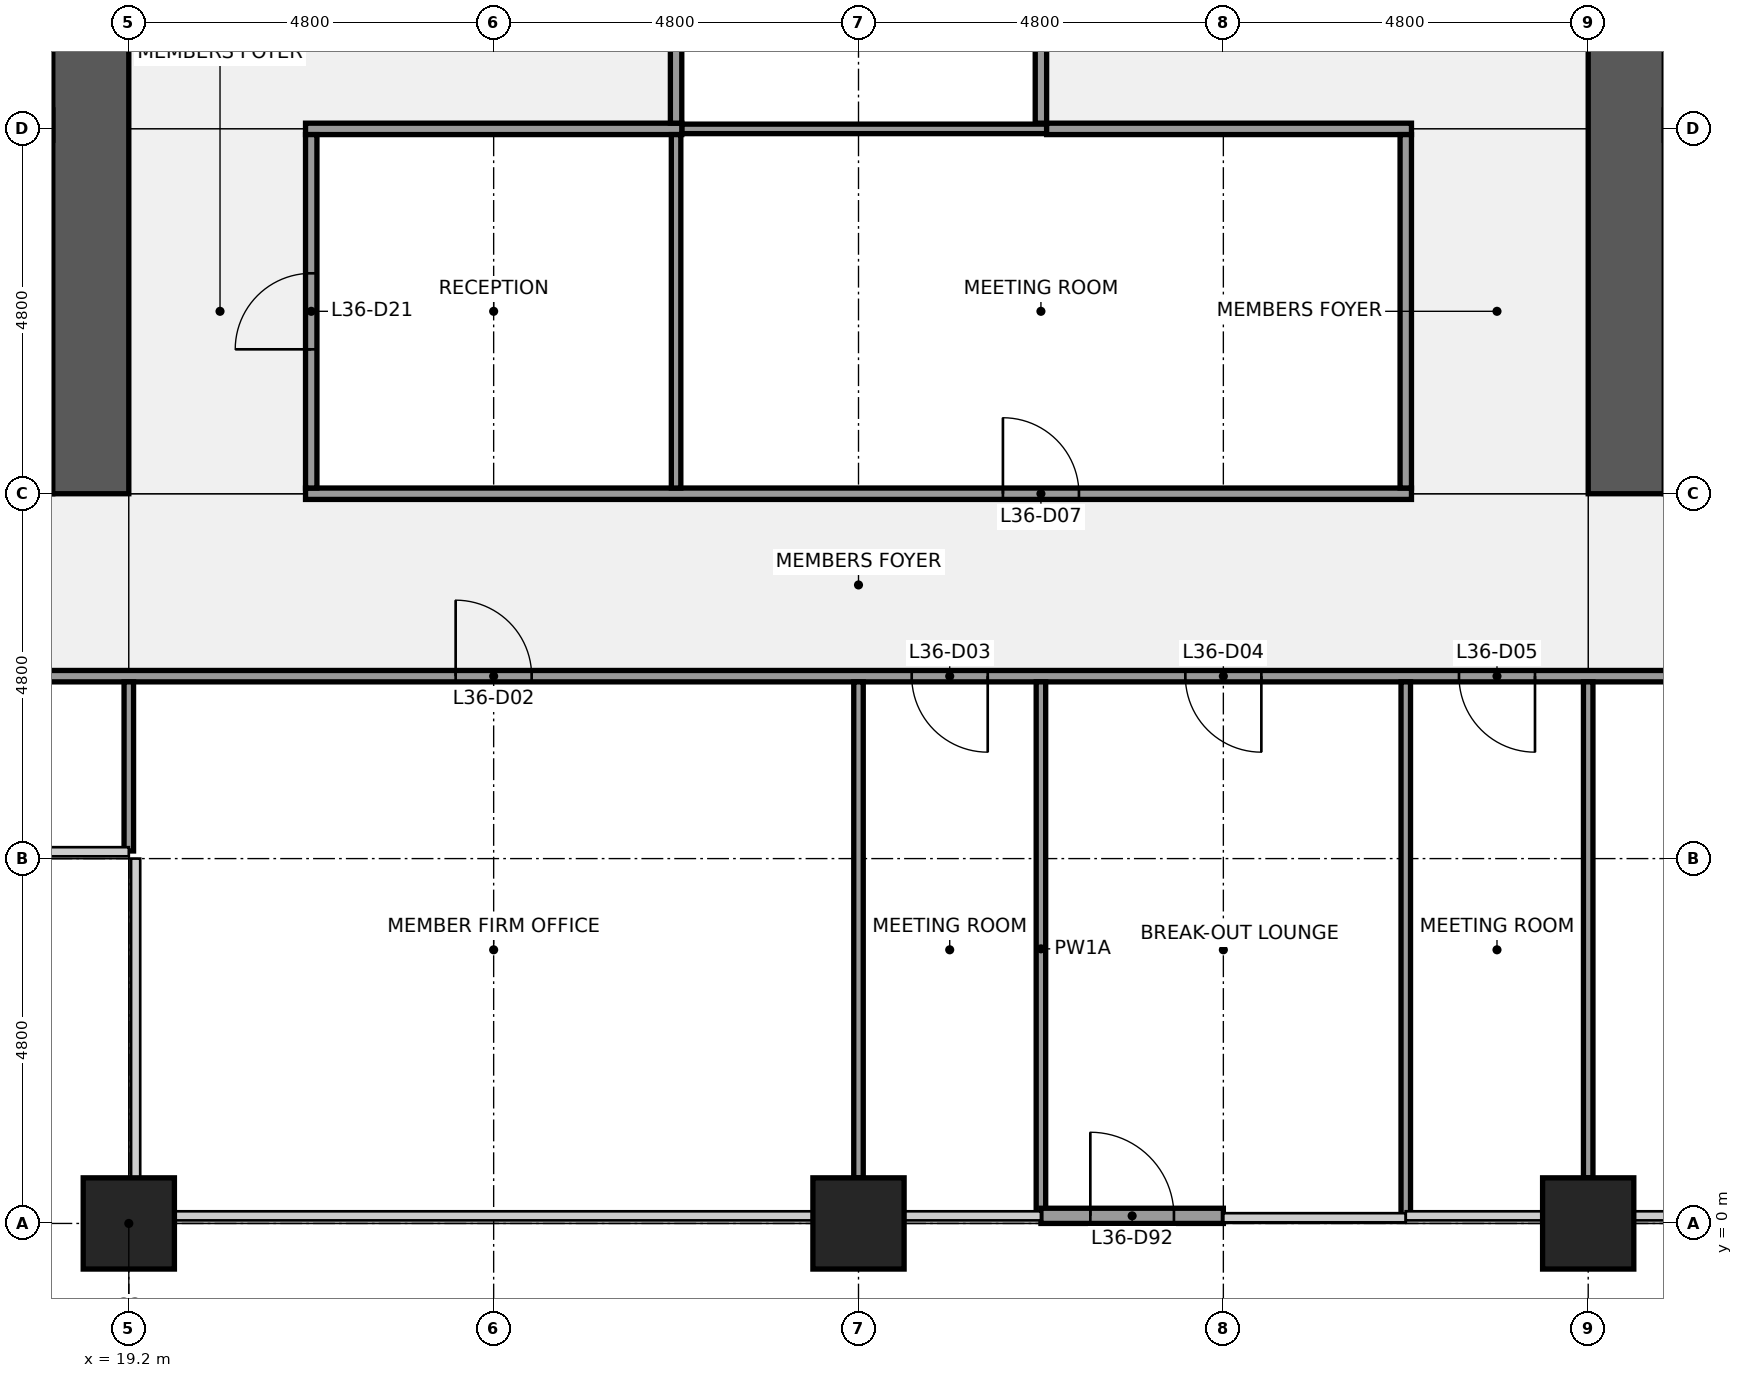
"""IFC4 building model, lengths in metres.
Left out: names, types, materials, properties, quantities, classifications, styles, units other than length and angle.
Written with IfcOpenShell. Run it as: python <this file> out.ifc"""

import sys

from ifc_helpers import new_model, si_unit, direction, frame, frame_2d, origin, origin_2d, place, context, subcontext, project, spatial, rectangle, extrude, element, fill, save


model = new_model("IFC4")
c1 = context("Model", 3, precision=1e-05, world=origin(), true_north=direction((0.0, 1.0)))
c2 = subcontext(c1, "Body", "Model", "MODEL_VIEW")
j1 = project(units=[si_unit("LENGTHUNIT", "METRE"), si_unit("PLANEANGLEUNIT", "RADIAN")], contexts=[c1])
p1 = place(None, origin())
s1 = spatial("IfcSite", under=j1, at=p1, CompositionType="ELEMENT")
p2 = place(p1, origin())
s2 = spatial("IfcBuilding", under=s1, at=p2, CompositionType="ELEMENT")
p3 = place(p2, frame((0.0, 0.0, 164.1)))
s3 = spatial("IfcBuildingStorey", under=s2, at=p3, CompositionType="ELEMENT", Elevation=164.1)
for number, where, z_axis, x_axis in (
    (1, (19.2, 0.0, 0.0), (0.0, 0.0, 1.0), (1.0, 0.0, 0.0)),
    (2, (28.8, 0.0, 0.0), (0.0, 0.0, 1.0), (1.0, 0.0, 0.0)),
    (3, (38.4, 0.0, 0.0), (0.0, 0.0, 1.0), (1.0, 0.0, 0.0)),
):
    element("IfcColumn", number, at=place(p3, frame(where, z_axis=z_axis, x_axis=x_axis)), inside=s3, PredefinedType="COLUMN", context=c2, shape_type="SweptSolid", body=[
        extrude(rectangle(XDim=1.2, YDim=1.2, at=origin_2d()), origin(), (0.0, 0.0, 1.0), 4.0),
    ])
p4 = place(p3, frame((18.2, 10.1, 0.0), z_axis=(0.0, 0.0, 1.0), x_axis=(-1.0, 0.0, 0.0)))
e4 = element("IfcWall", 4, at=p4, inside=s3, PredefinedType="SHEAR", context=c2, shape_type="SweptSolid", body=[
    extrude(rectangle(XDim=8.6, YDim=1.0, at=frame_2d((4.3, 0.0))), origin(), (0.0, 0.0, 1.0), 3.84),
])
p5 = place(p4, frame((0.85, 0.0, 0.0)))
e5 = element("IfcOpeningElement", 5, at=p5, cuts=e4, PredefinedType="OPENING", context=c2, shape_type="SweptSolid", body=[
    extrude(rectangle(XDim=1.1, YDim=2.1, at=frame_2d((0.55, 1.05))), frame((0.0, 0.51, 0.0), z_axis=(0.0, -1.0, 0.0), x_axis=(1.0, 0.0, 0.0)), (0.0, 0.0, 1.0), 1.02),
])
p6 = place(p3, frame((18.7, 38.4, 0.0), z_axis=(0.0, 0.0, 1.0), x_axis=(0.0, -1.0, 0.0)))
e6 = element("IfcWall", 6, at=p6, inside=s3, PredefinedType="SHEAR", context=c2, shape_type="SweptSolid", body=[
    extrude(rectangle(XDim=28.8, YDim=1.0, at=frame_2d((14.4, 0.0))), origin(), (0.0, 0.0, 1.0), 3.84),
])
p7 = place(p6, frame((18.3, 0.0, 0.0)))
e7 = element("IfcOpeningElement", 7, at=p7, cuts=e6, PredefinedType="OPENING", context=c2, shape_type="SweptSolid", body=[
    extrude(rectangle(XDim=1.8, YDim=2.1, at=frame_2d((0.9, 1.05))), frame((0.0, 0.51, 0.0), z_axis=(0.0, -1.0, 0.0), x_axis=(1.0, 0.0, 0.0)), (0.0, 0.0, 1.0), 1.02),
])
p8 = place(p6, frame((8.7, 0.0, 0.0)))
e8 = element("IfcOpeningElement", 8, at=p8, cuts=e6, PredefinedType="OPENING", context=c2, shape_type="SweptSolid", body=[
    extrude(rectangle(XDim=1.8, YDim=2.1, at=frame_2d((0.9, 1.05))), frame((0.0, 0.51, 0.0), z_axis=(0.0, -1.0, 0.0), x_axis=(1.0, 0.0, 0.0)), (0.0, 0.0, 1.0), 1.02),
])
p9 = place(p3, frame((1.0, 14.45, 0.0), z_axis=(0.0, 0.0, 1.0), x_axis=(1.0, 0.0, 0.0)))
e9 = element("IfcWall", 9, at=p9, inside=s3, PredefinedType="SHEAR", context=c2, shape_type="SweptSolid", body=[
    extrude(rectangle(XDim=17.2, YDim=0.4, at=frame_2d((8.6, 0.0))), origin(), (0.0, 0.0, 1.0), 3.84),
])
p10 = place(p3, frame((38.9, 9.6, 0.0), z_axis=(0.0, 0.0, 1.0), x_axis=(0.0, 1.0, 0.0)))
e10 = element("IfcWall", 10, at=p10, inside=s3, PredefinedType="SHEAR", context=c2, shape_type="SweptSolid", body=[
    extrude(rectangle(XDim=28.8, YDim=1.0, at=frame_2d((14.4, 0.0))), origin(), (0.0, 0.0, 1.0), 3.84),
])
p11 = place(p10, frame((8.7, 0.0, 0.0)))
e11 = element("IfcOpeningElement", 11, at=p11, cuts=e10, PredefinedType="OPENING", context=c2, shape_type="SweptSolid", body=[
    extrude(rectangle(XDim=1.8, YDim=2.1, at=frame_2d((0.9, 1.05))), frame((0.0, 0.51, 0.0), z_axis=(0.0, -1.0, 0.0), x_axis=(1.0, 0.0, 0.0)), (0.0, 0.0, 1.0), 1.02),
])
p12 = place(p10, frame((18.3, 0.0, 0.0)))
e12 = element("IfcOpeningElement", 12, at=p12, cuts=e10, PredefinedType="OPENING", context=c2, shape_type="SweptSolid", body=[
    extrude(rectangle(XDim=1.8, YDim=2.1, at=frame_2d((0.9, 1.05))), frame((0.0, 0.51, 0.0), z_axis=(0.0, -1.0, 0.0), x_axis=(1.0, 0.0, 0.0)), (0.0, 0.0, 1.0), 1.02),
])
p13 = place(p3, frame((9.7, 7.2, 0.0), z_axis=(0.0, 0.0, 1.0), x_axis=(1.0, 0.0, 0.0)))
e13 = element("IfcWall", 13, at=p13, inside=s3, PredefinedType="PARTITIONING", context=c2, shape_type="SweptSolid", body=[
    extrude(rectangle(XDim=38.2, YDim=0.15, at=frame_2d((19.1, 0.0))), origin(), (0.0, 0.0, 1.0), 2.936),
])
p14 = place(p13, frame((4.25, 0.0, 0.0)))
e14 = element("IfcOpeningElement", 14, at=p14, cuts=e13, PredefinedType="OPENING", context=c2, shape_type="SweptSolid", body=[
    extrude(rectangle(XDim=1.0, YDim=2.1, at=frame_2d((0.5, 1.05))), frame((0.0, 0.085, 0.0), z_axis=(0.0, -1.0, 0.0), x_axis=(1.0, 0.0, 0.0)), (0.0, 0.0, 1.0), 0.17),
])
p15 = place(p13, frame((13.8, 0.0, 0.0)))
e15 = element("IfcOpeningElement", 15, at=p15, cuts=e13, PredefinedType="OPENING", context=c2, shape_type="SweptSolid", body=[
    extrude(rectangle(XDim=1.0, YDim=2.1, at=frame_2d((0.5, 1.05))), frame((0.0, 0.085, 0.0), z_axis=(0.0, -1.0, 0.0), x_axis=(1.0, 0.0, 0.0)), (0.0, 0.0, 1.0), 0.17),
])
p16 = place(p13, frame((19.8, 0.0, 0.0)))
e16 = element("IfcOpeningElement", 16, at=p16, cuts=e13, PredefinedType="OPENING", context=c2, shape_type="SweptSolid", body=[
    extrude(rectangle(XDim=1.0, YDim=2.1, at=frame_2d((0.5, 1.05))), frame((0.0, 0.085, 0.0), z_axis=(0.0, -1.0, 0.0), x_axis=(1.0, 0.0, 0.0)), (0.0, 0.0, 1.0), 0.17),
])
p17 = place(p13, frame((23.4, 0.0, 0.0)))
e17 = element("IfcOpeningElement", 17, at=p17, cuts=e13, PredefinedType="OPENING", context=c2, shape_type="SweptSolid", body=[
    extrude(rectangle(XDim=1.0, YDim=2.1, at=frame_2d((0.5, 1.05))), frame((0.0, 0.085, 0.0), z_axis=(0.0, -1.0, 0.0), x_axis=(1.0, 0.0, 0.0)), (0.0, 0.0, 1.0), 0.17),
])
p18 = place(p13, frame((27.0, 0.0, 0.0)))
e18 = element("IfcOpeningElement", 18, at=p18, cuts=e13, PredefinedType="OPENING", context=c2, shape_type="SweptSolid", body=[
    extrude(rectangle(XDim=1.0, YDim=2.1, at=frame_2d((0.5, 1.05))), frame((0.0, 0.085, 0.0), z_axis=(0.0, -1.0, 0.0), x_axis=(1.0, 0.0, 0.0)), (0.0, 0.0, 1.0), 0.17),
])
p19 = place(p13, frame((32.95, 0.0, 0.0)))
e19 = element("IfcOpeningElement", 19, at=p19, cuts=e13, PredefinedType="OPENING", context=c2, shape_type="SweptSolid", body=[
    extrude(rectangle(XDim=1.0, YDim=2.1, at=frame_2d((0.5, 1.05))), frame((0.0, 0.085, 0.0), z_axis=(0.0, -1.0, 0.0), x_axis=(1.0, 0.0, 0.0)), (0.0, 0.0, 1.0), 0.17),
])
p20 = place(p3, frame((21.525, 9.6, 0.0), z_axis=(0.0, 0.0, 1.0), x_axis=(1.0, 0.0, 0.0)))
e20 = element("IfcWall", 20, at=p20, inside=s3, PredefinedType="PARTITIONING", context=c2, shape_type="SweptSolid", body=[
    extrude(rectangle(XDim=14.55, YDim=0.15, at=frame_2d((7.275, 0.0))), origin(), (0.0, 0.0, 1.0), 2.936),
])
p21 = place(p20, frame((9.175, 0.0, 0.0)))
e21 = element("IfcOpeningElement", 21, at=p21, cuts=e20, PredefinedType="OPENING", context=c2, shape_type="SweptSolid", body=[
    extrude(rectangle(XDim=1.0, YDim=2.1, at=frame_2d((0.5, 1.05))), frame((0.0, 0.085, 0.0), z_axis=(0.0, -1.0, 0.0), x_axis=(1.0, 0.0, 0.0)), (0.0, 0.0, 1.0), 0.17),
])
p22 = place(p3, frame((26.475, 14.4, 0.0), z_axis=(0.0, 0.0, 1.0), x_axis=(1.0, 0.0, 0.0)))
e22 = element("IfcWall", 22, at=p22, inside=s3, PredefinedType="PARTITIONING", context=c2, shape_type="SweptSolid", body=[
    extrude(rectangle(XDim=4.8, YDim=0.125, at=frame_2d((2.4, 0.0))), origin(), (0.0, 0.0, 1.0), 2.936),
])
p23 = place(p3, frame((21.525, 14.4, 0.0), z_axis=(0.0, 0.0, 1.0), x_axis=(1.0, 0.0, 0.0)))
e23 = element("IfcWall", 23, at=p23, inside=s3, PredefinedType="PARTITIONING", context=c2, shape_type="SweptSolid", body=[
    extrude(rectangle(XDim=4.95, YDim=0.15, at=frame_2d((2.475, 0.0))), origin(), (0.0, 0.0, 1.0), 2.936),
])
p24 = place(p3, frame((31.275, 14.4, 0.0), z_axis=(0.0, 0.0, 1.0), x_axis=(1.0, 0.0, 0.0)))
e24 = element("IfcWall", 24, at=p24, inside=s3, PredefinedType="PARTITIONING", context=c2, shape_type="SweptSolid", body=[
    extrude(rectangle(XDim=4.8, YDim=0.15, at=frame_2d((2.4, 0.0))), origin(), (0.0, 0.0, 1.0), 2.936),
])
p25 = place(p3, frame((19.2, 4.9, 0.0), z_axis=(0.0, 0.0, 1.0), x_axis=(0.0, 1.0, 0.0)))
e25 = element("IfcWall", 25, at=p25, inside=s3, PredefinedType="PARTITIONING", context=c2, shape_type="SweptSolid", body=[
    extrude(rectangle(XDim=2.225, YDim=0.125, at=frame_2d((1.113, 0.0))), origin(), (0.0, 0.0, 1.0), 2.936),
])
p26 = place(p3, frame((21.6, 9.675, 0.0), z_axis=(0.0, 0.0, 1.0), x_axis=(0.0, 1.0, 0.0)))
e26 = element("IfcWall", 26, at=p26, inside=s3, PredefinedType="PARTITIONING", context=c2, shape_type="SweptSolid", body=[
    extrude(rectangle(XDim=4.65, YDim=0.15, at=frame_2d((2.325, 0.0))), origin(), (0.0, 0.0, 1.0), 2.936),
])
p27 = place(p26, frame((1.825, 0.0, 0.0)))
e27 = element("IfcOpeningElement", 27, at=p27, cuts=e26, PredefinedType="OPENING", context=c2, shape_type="SweptSolid", body=[
    extrude(rectangle(XDim=1.0, YDim=2.1, at=frame_2d((0.5, 1.05))), frame((0.0, 0.085, 0.0), z_axis=(0.0, -1.0, 0.0), x_axis=(1.0, 0.0, 0.0)), (0.0, 0.0, 1.0), 0.17),
])
p28 = place(p3, frame((26.4, 9.675, 0.0), z_axis=(0.0, 0.0, 1.0), x_axis=(0.0, 1.0, 0.0)))
e28 = element("IfcWall", 28, at=p28, inside=s3, PredefinedType="PARTITIONING", context=c2, shape_type="SweptSolid", body=[
    extrude(rectangle(XDim=4.65, YDim=0.125, at=frame_2d((2.325, 0.0))), origin(), (0.0, 0.0, 1.0), 2.936),
])
p29 = place(p3, frame((26.4, 14.475, 0.0), z_axis=(0.0, 0.0, 1.0), x_axis=(0.0, 1.0, 0.0)))
e29 = element("IfcWall", 29, at=p29, inside=s3, PredefinedType="PARTITIONING", context=c2, shape_type="SweptSolid", body=[
    extrude(rectangle(XDim=13.05, YDim=0.15, at=frame_2d((6.525, 0.0))), origin(), (0.0, 0.0, 1.0), 2.936),
])
p30 = place(p29, frame((6.025, 0.0, 0.0)))
e30 = element("IfcOpeningElement", 30, at=p30, cuts=e29, PredefinedType="OPENING", context=c2, shape_type="SweptSolid", body=[
    extrude(rectangle(XDim=1.0, YDim=2.1, at=frame_2d((0.5, 1.05))), frame((0.0, 0.085, 0.0), z_axis=(0.0, -1.0, 0.0), x_axis=(1.0, 0.0, 0.0)), (0.0, 0.0, 1.0), 0.17),
])
p31 = place(p3, frame((28.8, 0.6, 0.0), z_axis=(0.0, 0.0, 1.0), x_axis=(0.0, 1.0, 0.0)))
e31 = element("IfcWall", 31, at=p31, inside=s3, PredefinedType="PARTITIONING", context=c2, shape_type="SweptSolid", body=[
    extrude(rectangle(XDim=6.525, YDim=0.125, at=frame_2d((3.262, 0.0))), origin(), (0.0, 0.0, 1.0), 2.936),
])
p32 = place(p3, frame((31.2, 0.1, 0.0), z_axis=(0.0, 0.0, 1.0), x_axis=(0.0, 1.0, 0.0)))
e32 = element("IfcWall", 32, at=p32, inside=s3, PredefinedType="PARTITIONING", context=c2, shape_type="SweptSolid", body=[
    extrude(rectangle(XDim=7.025, YDim=0.125, at=frame_2d((3.512, 0.0))), origin(), (0.0, 0.0, 1.0), 2.936),
])
p33 = place(p3, frame((31.2, 14.475, 0.0), z_axis=(0.0, 0.0, 1.0), x_axis=(0.0, 1.0, 0.0)))
e33 = element("IfcWall", 33, at=p33, inside=s3, PredefinedType="PARTITIONING", context=c2, shape_type="SweptSolid", body=[
    extrude(rectangle(XDim=13.05, YDim=0.15, at=frame_2d((6.525, 0.0))), origin(), (0.0, 0.0, 1.0), 2.936),
])
p34 = place(p3, frame((36.0, 0.1, 0.0), z_axis=(0.0, 0.0, 1.0), x_axis=(0.0, 1.0, 0.0)))
e34 = element("IfcWall", 34, at=p34, inside=s3, PredefinedType="PARTITIONING", context=c2, shape_type="SweptSolid", body=[
    extrude(rectangle(XDim=7.025, YDim=0.125, at=frame_2d((3.512, 0.0))), origin(), (0.0, 0.0, 1.0), 2.936),
])
p35 = place(p3, frame((36.0, 9.675, 0.0), z_axis=(0.0, 0.0, 1.0), x_axis=(0.0, 1.0, 0.0)))
e35 = element("IfcWall", 35, at=p35, inside=s3, PredefinedType="PARTITIONING", context=c2, shape_type="SweptSolid", body=[
    extrude(rectangle(XDim=4.65, YDim=0.15, at=frame_2d((2.325, 0.0))), origin(), (0.0, 0.0, 1.0), 2.936),
])
p36 = place(p3, frame((38.4, 0.6, 0.0), z_axis=(0.0, 0.0, 1.0), x_axis=(0.0, 1.0, 0.0)))
e36 = element("IfcWall", 36, at=p36, inside=s3, PredefinedType="PARTITIONING", context=c2, shape_type="SweptSolid", body=[
    extrude(rectangle(XDim=6.525, YDim=0.125, at=frame_2d((3.262, 0.0))), origin(), (0.0, 0.0, 1.0), 2.936),
])
p37 = place(p3, frame((31.2, 0.1, 0.0), z_axis=(0.0, 0.0, 1.0), x_axis=(1.0, 0.0, 0.0)))
e37 = element("IfcWall", 37, at=p37, inside=s3, PredefinedType="SOLIDWALL", context=c2, shape_type="SweptSolid", body=[
    extrude(rectangle(XDim=2.4, YDim=0.2, at=frame_2d((1.2, 0.0))), origin(), (0.0, 0.0, 1.0), 3.314),
])
p38 = place(p37, frame((0.65, 0.0, 0.0)))
e38 = element("IfcOpeningElement", 38, at=p38, cuts=e37, PredefinedType="OPENING", context=c2, shape_type="SweptSolid", body=[
    extrude(rectangle(XDim=1.1, YDim=2.1, at=frame_2d((0.55, 1.05))), frame((0.0, 0.11, 0.0), z_axis=(0.0, -1.0, 0.0), x_axis=(1.0, 0.0, 0.0)), (0.0, 0.0, 1.0), 0.22),
])
for number, where, z_axis, x_axis in (
    (39, (19.2, -1.05, 0.0), (0.0, 0.0, 1.0), (1.0, 0.0, 0.0)),
    (40, (38.4, -1.05, 0.0), (0.0, 0.0, 1.0), (1.0, 0.0, 0.0)),
):
    element("IfcColumn", number, at=place(p3, frame(where, z_axis=z_axis, x_axis=x_axis)), inside=s3, PredefinedType="PILASTER", context=c2, shape_type="SweptSolid", body=[
        extrude(rectangle(XDim=3.6, YDim=0.9, at=origin_2d()), origin(), (0.0, 0.0, 1.0), 4.0),
    ])
p39 = place(p15, origin())
e41 = element("IfcDoor", 41, at=p39, inside=s3, OperationType="SINGLE_SWING_LEFT", PredefinedType="DOOR", context=c2, shape_type="SweptSolid", body=[
    extrude(rectangle(XDim=1.0, YDim=2.1, at=frame_2d((0.5, 1.05))), frame((0.0, 0.025, 0.0), z_axis=(0.0, -1.0, 0.0), x_axis=(1.0, 0.0, 0.0)), (0.0, 0.0, 1.0), 0.05),
])
fill(e15, e41)
p40 = place(p16, origin())
e42 = element("IfcDoor", 42, at=p40, inside=s3, OperationType="SINGLE_SWING_RIGHT", PredefinedType="DOOR", context=c2, shape_type="SweptSolid", body=[
    extrude(rectangle(XDim=1.0, YDim=2.1, at=frame_2d((0.5, 1.05))), frame((0.0, 0.025, 0.0), z_axis=(0.0, -1.0, 0.0), x_axis=(1.0, 0.0, 0.0)), (0.0, 0.0, 1.0), 0.05),
])
fill(e16, e42)
p41 = place(p17, origin())
e43 = element("IfcDoor", 43, at=p41, inside=s3, OperationType="SINGLE_SWING_RIGHT", PredefinedType="DOOR", context=c2, shape_type="SweptSolid", body=[
    extrude(rectangle(XDim=1.0, YDim=2.1, at=frame_2d((0.5, 1.05))), frame((0.0, 0.025, 0.0), z_axis=(0.0, -1.0, 0.0), x_axis=(1.0, 0.0, 0.0)), (0.0, 0.0, 1.0), 0.05),
])
fill(e17, e43)
p42 = place(p18, origin())
e44 = element("IfcDoor", 44, at=p42, inside=s3, OperationType="SINGLE_SWING_RIGHT", PredefinedType="DOOR", context=c2, shape_type="SweptSolid", body=[
    extrude(rectangle(XDim=1.0, YDim=2.1, at=frame_2d((0.5, 1.05))), frame((0.0, 0.025, 0.0), z_axis=(0.0, -1.0, 0.0), x_axis=(1.0, 0.0, 0.0)), (0.0, 0.0, 1.0), 0.05),
])
fill(e18, e44)
p43 = place(p21, origin())
e45 = element("IfcDoor", 45, at=p43, inside=s3, OperationType="SINGLE_SWING_LEFT", PredefinedType="DOOR", context=c2, shape_type="SweptSolid", body=[
    extrude(rectangle(XDim=1.0, YDim=2.1, at=frame_2d((0.5, 1.05))), frame((0.0, 0.025, 0.0), z_axis=(0.0, -1.0, 0.0), x_axis=(1.0, 0.0, 0.0)), (0.0, 0.0, 1.0), 0.05),
])
fill(e21, e45)
p44 = place(p27, origin())
e46 = element("IfcDoor", 46, at=p44, inside=s3, OperationType="SINGLE_SWING_LEFT", PredefinedType="DOOR", context=c2, shape_type="SweptSolid", body=[
    extrude(rectangle(XDim=1.0, YDim=2.1, at=frame_2d((0.5, 1.05))), frame((0.0, 0.025, 0.0), z_axis=(0.0, -1.0, 0.0), x_axis=(1.0, 0.0, 0.0)), (0.0, 0.0, 1.0), 0.05),
])
fill(e27, e46)
p45 = place(p38, origin())
e47 = element("IfcDoor", 47, at=p45, inside=s3, OperationType="SINGLE_SWING_LEFT", PredefinedType="DOOR", context=c2, shape_type="SweptSolid", body=[
    extrude(rectangle(XDim=1.1, YDim=2.1, at=frame_2d((0.55, 1.05))), frame((0.0, 0.025, 0.0), z_axis=(0.0, -1.0, 0.0), x_axis=(1.0, 0.0, 0.0)), (0.0, 0.0, 1.0), 0.05),
])
fill(e38, e47)
save(model, sys.argv[1])
